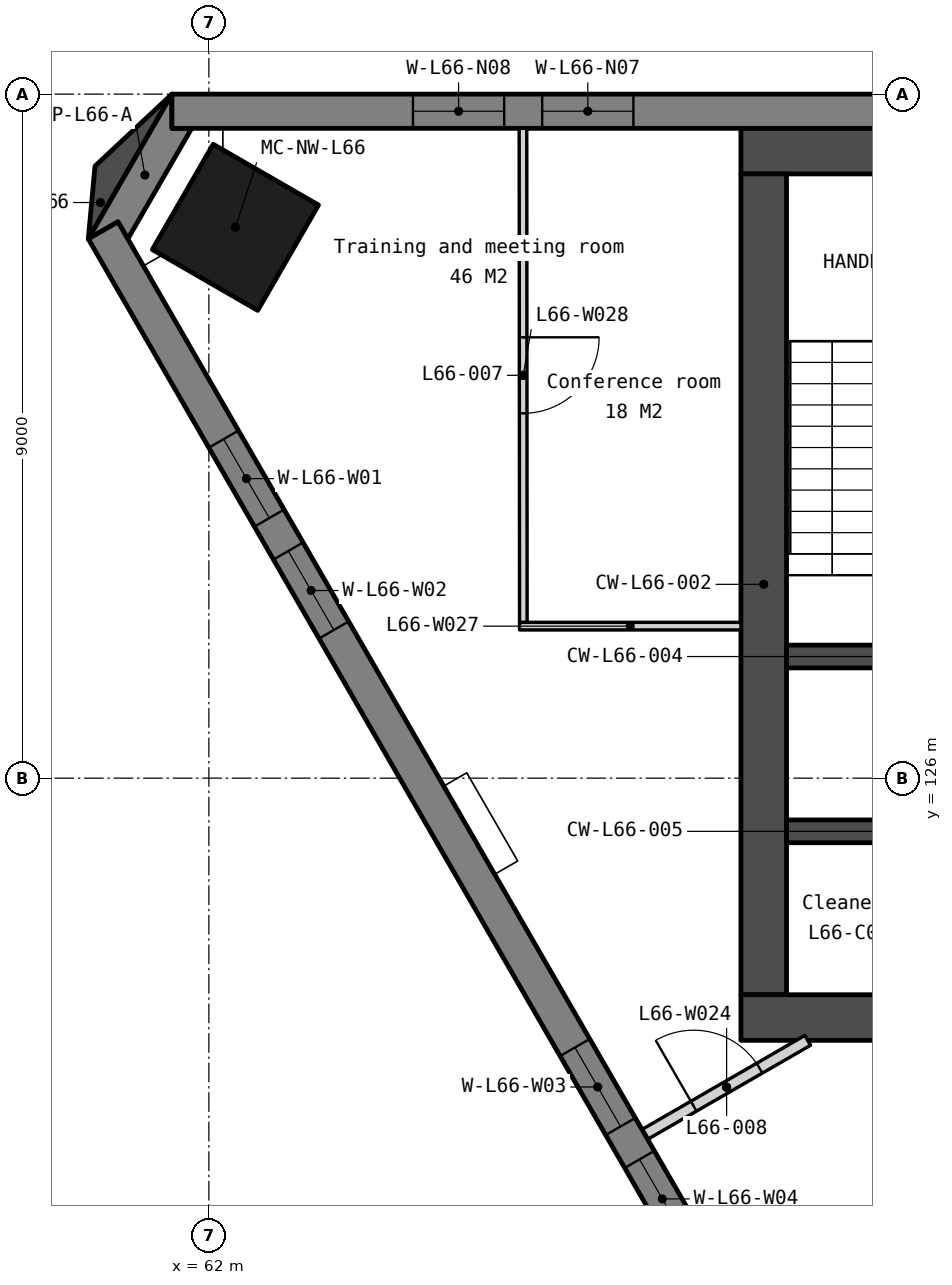
"""IFC4 building model, lengths in metres.
Left out: names, types, materials, properties, quantities, classifications, styles, units other than length and angle.
Written with IfcOpenShell. Run it as: python <this file> out.ifc"""

import sys

from ifc_helpers import new_model, si_unit, direction, frame, frame_2d, origin, origin_2d, place, context, subcontext, project, spatial, polyline, rectangle, outline, extrude, element, fill, save


model = new_model("IFC4")
c1 = context("Model", 3, precision=1e-05, world=origin(), true_north=direction((0.0, 1.0)))
c2 = subcontext(c1, "Body", "Model", "MODEL_VIEW")
j1 = project(units=[si_unit("LENGTHUNIT", "METRE"), si_unit("PLANEANGLEUNIT", "RADIAN")], contexts=[c1])
p1 = place(None, origin())
s1 = spatial("IfcSite", under=j1, at=p1, CompositionType="ELEMENT")
p2 = place(p1, origin())
s2 = spatial("IfcBuilding", under=s1, at=p2, CompositionType="ELEMENT")
p3 = place(p2, frame((0.0, 0.0, 269.9)))
s3 = spatial("IfcBuildingStorey", under=s2, at=p3, CompositionType="ELEMENT", Elevation=269.9)
p4 = place(p3, frame((62.349, 133.247, 0.0), z_axis=(0.0, 0.0, 1.0), x_axis=(-0.5, -0.866025403784, 0.0)))
e1 = element("IfcColumn", 1, at=p4, inside=s3, PredefinedType="COLUMN", context=c2, shape_type="SweptSolid", body=[
    extrude(rectangle(XDim=1.6, YDim=1.6, at=origin_2d()), origin(), (0.0, 0.0, 1.0), 3.9),
])
p5 = place(p3, frame((69.0, 134.25, 0.0), z_axis=(0.0, 0.0, 1.0), x_axis=(1.0, 0.0, 0.0)))
e2 = element("IfcWall", 2, at=p5, inside=s3, PredefinedType="SOLIDWALL", context=c2, shape_type="SweptSolid", body=[
    extrude(rectangle(XDim=22.0, YDim=0.6, at=frame_2d((11.0, 0.0))), origin(), (0.0, 0.0, 1.0), 3.75),
])
p6 = place(p3, frame((69.3, 133.95, 0.0), z_axis=(0.0, 0.0, 1.0), x_axis=(0.0, -1.0, 0.0)))
e3 = element("IfcWall", 3, at=p6, inside=s3, PredefinedType="SOLIDWALL", context=c2, shape_type="SweptSolid", body=[
    extrude(rectangle(XDim=10.8, YDim=0.6, at=frame_2d((5.4, 0.0))), origin(), (0.0, 0.0, 1.0), 3.75),
])
p7 = place(p3, frame((69.0, 122.85, 0.0), z_axis=(0.0, 0.0, 1.0), x_axis=(1.0, 0.0, 0.0)))
e4 = element("IfcWall", 4, at=p7, inside=s3, PredefinedType="SOLIDWALL", context=c2, shape_type="SweptSolid", body=[
    extrude(rectangle(XDim=22.0, YDim=0.6, at=frame_2d((11.0, 0.0))), origin(), (0.0, 0.0, 1.0), 3.75),
])
p8 = place(p7, frame((16.375, 0.0, 0.0)))
e5 = element("IfcOpeningElement", 5, at=p8, cuts=e4, PredefinedType="OPENING", context=c2, shape_type="SweptSolid", body=[
    extrude(rectangle(XDim=1.8, YDim=2.1, at=frame_2d((0.9, 1.05))), frame((0.0, 0.31, 0.0), z_axis=(0.0, -1.0, 0.0), x_axis=(1.0, 0.0, 0.0)), (0.0, 0.0, 1.0), 0.62),
])
p9 = place(p7, frame((3.825, 0.0, 0.0)))
e6 = element("IfcOpeningElement", 6, at=p9, cuts=e4, PredefinedType="OPENING", context=c2, shape_type="SweptSolid", body=[
    extrude(rectangle(XDim=1.8, YDim=2.1, at=frame_2d((0.9, 1.05))), frame((0.0, 0.31, 0.0), z_axis=(0.0, -1.0, 0.0), x_axis=(1.0, 0.0, 0.0)), (0.0, 0.0, 1.0), 0.62),
])
p10 = place(p7, frame((12.85, 0.0, 0.0)))
e7 = element("IfcOpeningElement", 7, at=p10, cuts=e4, PredefinedType="OPENING", context=c2, shape_type="SweptSolid", body=[
    extrude(rectangle(XDim=1.5, YDim=2.1, at=frame_2d((0.75, 1.05))), frame((0.0, 0.31, 0.0), z_axis=(0.0, -1.0, 0.0), x_axis=(1.0, 0.0, 0.0)), (0.0, 0.0, 1.0), 0.62),
])
for number, where, z_axis, x_axis in (
    (8, (69.6, 127.6, 0.0), (0.0, 0.0, 1.0), (1.0, 0.0, 0.0)),
    (9, (69.6, 125.3, 0.0), (0.0, 0.0, 1.0), (1.0, 0.0, 0.0)),
):
    element("IfcWall", number, at=place(p3, frame(where, z_axis=z_axis, x_axis=x_axis)), inside=s3, PredefinedType="SOLIDWALL", context=c2, shape_type="SweptSolid", body=[
        extrude(rectangle(XDim=2.55, YDim=0.3, at=frame_2d((1.275, 0.0))), origin(), (0.0, 0.0, 1.0), 3.75),
    ])
p11 = place(p3, frame((0.0, 0.0, -0.15)))
e10 = element("IfcWall", 10, at=p11, inside=s3, PredefinedType="SOLIDWALL", context=c2, shape_type="SweptSolid", body=[
    extrude(outline(polyline([(61.514, 135.0), (61.514, 134.55), (61.774, 134.55), (60.933, 133.095), (60.803, 133.32), (60.414, 133.095), (61.514, 135.0)])), origin(), (0.0, 0.0, 1.0), 3.9),
])
p12 = place(p3, frame((98.486, 134.775, -0.15), z_axis=(0.0, 0.0, 1.0), x_axis=(-1.0, 0.0, 0.0)))
e11 = element("IfcWall", 11, at=p12, inside=s3, PredefinedType="SOLIDWALL", context=c2, shape_type="SweptSolid", body=[
    extrude(outline(polyline([(36.972, 0.0), (36.972, 3.9), (0.0, 3.9), (0.0, 0.0), (36.972, 0.0)])), frame((0.0, 0.225, 0.0), z_axis=(0.0, -1.0, 0.0), x_axis=(1.0, 0.0, 0.0)), (0.0, 0.0, 1.0), 0.45),
])
p13 = place(p12, frame((3.172, 0.0, 0.95)))
e12 = element("IfcOpeningElement", 12, at=p13, cuts=e11, PredefinedType="OPENING", context=c2, shape_type="SweptSolid", body=[
    extrude(rectangle(XDim=1.2, YDim=2.2, at=frame_2d((0.6, 1.1))), frame((0.0, 0.235, 0.0), z_axis=(0.0, -1.0, 0.0), x_axis=(1.0, 0.0, 0.0)), (0.0, 0.0, 1.0), 0.47),
])
p14 = place(p12, frame((4.872, 0.0, 0.95)))
e13 = element("IfcOpeningElement", 13, at=p14, cuts=e11, PredefinedType="OPENING", context=c2, shape_type="SweptSolid", body=[
    extrude(rectangle(XDim=1.2, YDim=2.2, at=frame_2d((0.6, 1.1))), frame((0.0, 0.235, 0.0), z_axis=(0.0, -1.0, 0.0), x_axis=(1.0, 0.0, 0.0)), (0.0, 0.0, 1.0), 0.47),
])
p15 = place(p12, frame((12.415, 0.0, 0.95)))
e14 = element("IfcOpeningElement", 14, at=p15, cuts=e11, PredefinedType="OPENING", context=c2, shape_type="SweptSolid", body=[
    extrude(rectangle(XDim=1.2, YDim=2.2, at=frame_2d((0.6, 1.1))), frame((0.0, 0.235, 0.0), z_axis=(0.0, -1.0, 0.0), x_axis=(1.0, 0.0, 0.0)), (0.0, 0.0, 1.0), 0.47),
])
p16 = place(p12, frame((14.115, 0.0, 0.95)))
e15 = element("IfcOpeningElement", 15, at=p16, cuts=e11, PredefinedType="OPENING", context=c2, shape_type="SweptSolid", body=[
    extrude(rectangle(XDim=1.2, YDim=2.2, at=frame_2d((0.6, 1.1))), frame((0.0, 0.235, 0.0), z_axis=(0.0, -1.0, 0.0), x_axis=(1.0, 0.0, 0.0)), (0.0, 0.0, 1.0), 0.47),
])
p17 = place(p12, frame((21.658, 0.0, 0.95)))
e16 = element("IfcOpeningElement", 16, at=p17, cuts=e11, PredefinedType="OPENING", context=c2, shape_type="SweptSolid", body=[
    extrude(rectangle(XDim=1.2, YDim=2.2, at=frame_2d((0.6, 1.1))), frame((0.0, 0.235, 0.0), z_axis=(0.0, -1.0, 0.0), x_axis=(1.0, 0.0, 0.0)), (0.0, 0.0, 1.0), 0.47),
])
p18 = place(p12, frame((23.358, 0.0, 0.95)))
e17 = element("IfcOpeningElement", 17, at=p18, cuts=e11, PredefinedType="OPENING", context=c2, shape_type="SweptSolid", body=[
    extrude(rectangle(XDim=1.2, YDim=2.2, at=frame_2d((0.6, 1.1))), frame((0.0, 0.235, 0.0), z_axis=(0.0, -1.0, 0.0), x_axis=(1.0, 0.0, 0.0)), (0.0, 0.0, 1.0), 0.47),
])
p19 = place(p12, frame((30.901, 0.0, 0.95)))
e18 = element("IfcOpeningElement", 18, at=p19, cuts=e11, PredefinedType="OPENING", context=c2, shape_type="SweptSolid", body=[
    extrude(rectangle(XDim=1.2, YDim=2.2, at=frame_2d((0.6, 1.1))), frame((0.0, 0.235, 0.0), z_axis=(0.0, -1.0, 0.0), x_axis=(1.0, 0.0, 0.0)), (0.0, 0.0, 1.0), 0.47),
])
p20 = place(p12, frame((32.601, 0.0, 0.95)))
e19 = element("IfcOpeningElement", 19, at=p20, cuts=e11, PredefinedType="OPENING", context=c2, shape_type="SweptSolid", body=[
    extrude(rectangle(XDim=1.2, YDim=2.2, at=frame_2d((0.6, 1.1))), frame((0.0, 0.235, 0.0), z_axis=(0.0, -1.0, 0.0), x_axis=(1.0, 0.0, 0.0)), (0.0, 0.0, 1.0), 0.47),
])
p21 = place(p3, frame((60.609, 133.207, -0.15), z_axis=(0.0, 0.0, 1.0), x_axis=(0.500002536638, -0.866023939251, 0.0)))
e20 = element("IfcWall", 20, at=p21, inside=s3, PredefinedType="SOLIDWALL", context=c2, shape_type="SweptSolid", body=[
    extrude(outline(polyline([(36.972, 0.0), (36.972, 3.9), (0.0, 3.9), (0.0, 0.0), (36.972, 0.0)])), frame((0.0, 0.225, 0.0), z_axis=(0.0, -1.0, 0.0), x_axis=(1.0, 0.0, 0.0)), (0.0, 0.0, 1.0), 0.45),
])
p22 = place(p21, frame((3.172, 0.0, 0.95)))
e21 = element("IfcOpeningElement", 21, at=p22, cuts=e20, PredefinedType="OPENING", context=c2, shape_type="SweptSolid", body=[
    extrude(rectangle(XDim=1.2, YDim=2.2, at=frame_2d((0.6, 1.1))), frame((0.0, 0.235, 0.0), z_axis=(0.0, -1.0, 0.0), x_axis=(1.0, 0.0, 0.0)), (0.0, 0.0, 1.0), 0.47),
])
p23 = place(p21, frame((4.872, 0.0, 0.95)))
e22 = element("IfcOpeningElement", 22, at=p23, cuts=e20, PredefinedType="OPENING", context=c2, shape_type="SweptSolid", body=[
    extrude(rectangle(XDim=1.2, YDim=2.2, at=frame_2d((0.6, 1.1))), frame((0.0, 0.235, 0.0), z_axis=(0.0, -1.0, 0.0), x_axis=(1.0, 0.0, 0.0)), (0.0, 0.0, 1.0), 0.47),
])
p24 = place(p21, frame((12.415, 0.0, 0.95)))
e23 = element("IfcOpeningElement", 23, at=p24, cuts=e20, PredefinedType="OPENING", context=c2, shape_type="SweptSolid", body=[
    extrude(rectangle(XDim=1.2, YDim=2.2, at=frame_2d((0.6, 1.1))), frame((0.0, 0.235, 0.0), z_axis=(0.0, -1.0, 0.0), x_axis=(1.0, 0.0, 0.0)), (0.0, 0.0, 1.0), 0.47),
])
p25 = place(p21, frame((14.115, 0.0, 0.95)))
e24 = element("IfcOpeningElement", 24, at=p25, cuts=e20, PredefinedType="OPENING", context=c2, shape_type="SweptSolid", body=[
    extrude(rectangle(XDim=1.2, YDim=2.2, at=frame_2d((0.6, 1.1))), frame((0.0, 0.235, 0.0), z_axis=(0.0, -1.0, 0.0), x_axis=(1.0, 0.0, 0.0)), (0.0, 0.0, 1.0), 0.47),
])
p26 = place(p21, frame((21.658, 0.0, 0.95)))
e25 = element("IfcOpeningElement", 25, at=p26, cuts=e20, PredefinedType="OPENING", context=c2, shape_type="SweptSolid", body=[
    extrude(rectangle(XDim=1.2, YDim=2.2, at=frame_2d((0.6, 1.1))), frame((0.0, 0.235, 0.0), z_axis=(0.0, -1.0, 0.0), x_axis=(1.0, 0.0, 0.0)), (0.0, 0.0, 1.0), 0.47),
])
p27 = place(p21, frame((23.358, 0.0, 0.95)))
e26 = element("IfcOpeningElement", 26, at=p27, cuts=e20, PredefinedType="OPENING", context=c2, shape_type="SweptSolid", body=[
    extrude(rectangle(XDim=1.2, YDim=2.2, at=frame_2d((0.6, 1.1))), frame((0.0, 0.235, 0.0), z_axis=(0.0, -1.0, 0.0), x_axis=(1.0, 0.0, 0.0)), (0.0, 0.0, 1.0), 0.47),
])
p28 = place(p21, frame((30.901, 0.0, 0.95)))
e27 = element("IfcOpeningElement", 27, at=p28, cuts=e20, PredefinedType="OPENING", context=c2, shape_type="SweptSolid", body=[
    extrude(rectangle(XDim=1.2, YDim=2.2, at=frame_2d((0.6, 1.1))), frame((0.0, 0.235, 0.0), z_axis=(0.0, -1.0, 0.0), x_axis=(1.0, 0.0, 0.0)), (0.0, 0.0, 1.0), 0.47),
])
p29 = place(p21, frame((32.601, 0.0, 0.95)))
e28 = element("IfcOpeningElement", 28, at=p29, cuts=e20, PredefinedType="OPENING", context=c2, shape_type="SweptSolid", body=[
    extrude(rectangle(XDim=1.2, YDim=2.2, at=frame_2d((0.6, 1.1))), frame((0.0, 0.235, 0.0), z_axis=(0.0, -1.0, 0.0), x_axis=(1.0, 0.0, 0.0)), (0.0, 0.0, 1.0), 0.47),
])
p30 = place(p3, frame((0.0, 0.0, -0.15)))
e29 = element("IfcWall", 29, at=p30, inside=s3, PredefinedType="SOLIDWALL", context=c2, shape_type="SweptSolid", body=[
    extrude(outline(polyline([(61.514, 135.0), (60.502, 134.052), (60.414, 133.095), (61.514, 135.0)])), origin(), (0.0, 0.0, 1.0), 3.9),
])
p31 = place(p3, frame((67.745, 121.318, 0.0), z_axis=(0.0, 0.0, 1.0), x_axis=(0.865990916707, 0.500059728613, 0.0)))
e30 = element("IfcWall", 30, at=p31, inside=s3, PredefinedType="PARTITIONING", context=c2, shape_type="SweptSolid", body=[
    extrude(rectangle(XDim=2.465, YDim=0.15, at=frame_2d((1.232, 0.0))), origin(), (0.0, 0.0, 1.0), 3.75),
])
p32 = place(p31, frame((0.732, 0.0, 0.0)))
e31 = element("IfcOpeningElement", 31, at=p32, cuts=e30, PredefinedType="OPENING", context=c2, shape_type="SweptSolid", body=[
    extrude(rectangle(XDim=1.0, YDim=2.1, at=frame_2d((0.5, 1.05))), frame((0.0, 0.085, 0.0), z_axis=(0.0, -1.0, 0.0), x_axis=(1.0, 0.0, 0.0)), (0.0, 0.0, 1.0), 0.17),
])
p33 = place(p3, frame((66.087, 128.0, 0.0), z_axis=(0.0, 0.0, 1.0), x_axis=(1.0, 0.0, 0.0)))
e32 = element("IfcWall", 32, at=p33, inside=s3, PredefinedType="PARTITIONING", context=c2, shape_type="SweptSolid", body=[
    extrude(rectangle(XDim=2.913, YDim=0.1, at=frame_2d((1.456, 0.0))), origin(), (0.0, 0.0, 1.0), 3.75),
])
p34 = place(p3, frame((66.132, 134.55, 0.0), z_axis=(0.0, 0.0, 1.0), x_axis=(0.000788761774, -0.999999688927, 0.0)))
e33 = element("IfcWall", 33, at=p34, inside=s3, PredefinedType="PARTITIONING", context=c2, shape_type="SweptSolid", body=[
    extrude(rectangle(XDim=6.5, YDim=0.1, at=frame_2d((3.25, 0.0))), origin(), (0.0, 0.0, 1.0), 3.75),
])
p35 = place(p34, frame((2.75, 0.0, 0.0)))
e34 = element("IfcOpeningElement", 34, at=p35, cuts=e33, PredefinedType="OPENING", context=c2, shape_type="SweptSolid", body=[
    extrude(rectangle(XDim=1.0, YDim=2.1, at=frame_2d((0.5, 1.05))), frame((0.0, 0.06, 0.0), z_axis=(0.0, -1.0, 0.0), x_axis=(1.0, 0.0, 0.0)), (0.0, 0.0, 1.0), 0.12),
])
p36 = place(p19, origin())
e35 = element("IfcWindow", 35, at=p36, inside=s3, PartitioningType="SINGLE_PANEL", PredefinedType="WINDOW", context=c2, shape_type="SweptSolid", body=[
    extrude(rectangle(XDim=1.2, YDim=2.2, at=frame_2d((0.6, 1.1))), frame((0.0, 0.03, 0.0), z_axis=(0.0, -1.0, 0.0), x_axis=(1.0, 0.0, 0.0)), (0.0, 0.0, 1.0), 0.06),
])
fill(e18, e35)
p37 = place(p20, origin())
e36 = element("IfcWindow", 36, at=p37, inside=s3, PartitioningType="SINGLE_PANEL", PredefinedType="WINDOW", context=c2, shape_type="SweptSolid", body=[
    extrude(rectangle(XDim=1.2, YDim=2.2, at=frame_2d((0.6, 1.1))), frame((0.0, 0.03, 0.0), z_axis=(0.0, -1.0, 0.0), x_axis=(1.0, 0.0, 0.0)), (0.0, 0.0, 1.0), 0.06),
])
fill(e19, e36)
p38 = place(p22, origin())
e37 = element("IfcWindow", 37, at=p38, inside=s3, PartitioningType="SINGLE_PANEL", PredefinedType="WINDOW", context=c2, shape_type="SweptSolid", body=[
    extrude(rectangle(XDim=1.2, YDim=2.2, at=frame_2d((0.6, 1.1))), frame((0.0, 0.03, 0.0), z_axis=(0.0, -1.0, 0.0), x_axis=(1.0, 0.0, 0.0)), (0.0, 0.0, 1.0), 0.06),
])
fill(e21, e37)
p39 = place(p23, origin())
e38 = element("IfcWindow", 38, at=p39, inside=s3, PartitioningType="SINGLE_PANEL", PredefinedType="WINDOW", context=c2, shape_type="SweptSolid", body=[
    extrude(rectangle(XDim=1.2, YDim=2.2, at=frame_2d((0.6, 1.1))), frame((0.0, 0.03, 0.0), z_axis=(0.0, -1.0, 0.0), x_axis=(1.0, 0.0, 0.0)), (0.0, 0.0, 1.0), 0.06),
])
fill(e22, e38)
p40 = place(p24, origin())
e39 = element("IfcWindow", 39, at=p40, inside=s3, PartitioningType="SINGLE_PANEL", PredefinedType="WINDOW", context=c2, shape_type="SweptSolid", body=[
    extrude(rectangle(XDim=1.2, YDim=2.2, at=frame_2d((0.6, 1.1))), frame((0.0, 0.03, 0.0), z_axis=(0.0, -1.0, 0.0), x_axis=(1.0, 0.0, 0.0)), (0.0, 0.0, 1.0), 0.06),
])
fill(e23, e39)
p41 = place(p25, origin())
e40 = element("IfcWindow", 40, at=p41, inside=s3, PartitioningType="SINGLE_PANEL", PredefinedType="WINDOW", context=c2, shape_type="SweptSolid", body=[
    extrude(rectangle(XDim=1.2, YDim=2.2, at=frame_2d((0.6, 1.1))), frame((0.0, 0.03, 0.0), z_axis=(0.0, -1.0, 0.0), x_axis=(1.0, 0.0, 0.0)), (0.0, 0.0, 1.0), 0.06),
])
fill(e24, e40)
p42 = place(p35, origin())
e41 = element("IfcDoor", 41, at=p42, inside=s3, OperationType="SINGLE_SWING_LEFT", PredefinedType="DOOR", context=c2, shape_type="SweptSolid", body=[
    extrude(rectangle(XDim=1.0, YDim=2.1, at=frame_2d((0.5, 1.05))), frame((0.0, 0.025, 0.0), z_axis=(0.0, -1.0, 0.0), x_axis=(1.0, 0.0, 0.0)), (0.0, 0.0, 1.0), 0.05),
])
fill(e34, e41)
p43 = place(p32, origin())
e42 = element("IfcDoor", 42, at=p43, inside=s3, OperationType="SINGLE_SWING_LEFT", PredefinedType="DOOR", context=c2, shape_type="SweptSolid", body=[
    extrude(rectangle(XDim=1.0, YDim=2.1, at=frame_2d((0.5, 1.05))), frame((0.0, 0.025, 0.0), z_axis=(0.0, -1.0, 0.0), x_axis=(1.0, 0.0, 0.0)), (0.0, 0.0, 1.0), 0.05),
])
fill(e31, e42)
save(model, sys.argv[1])
